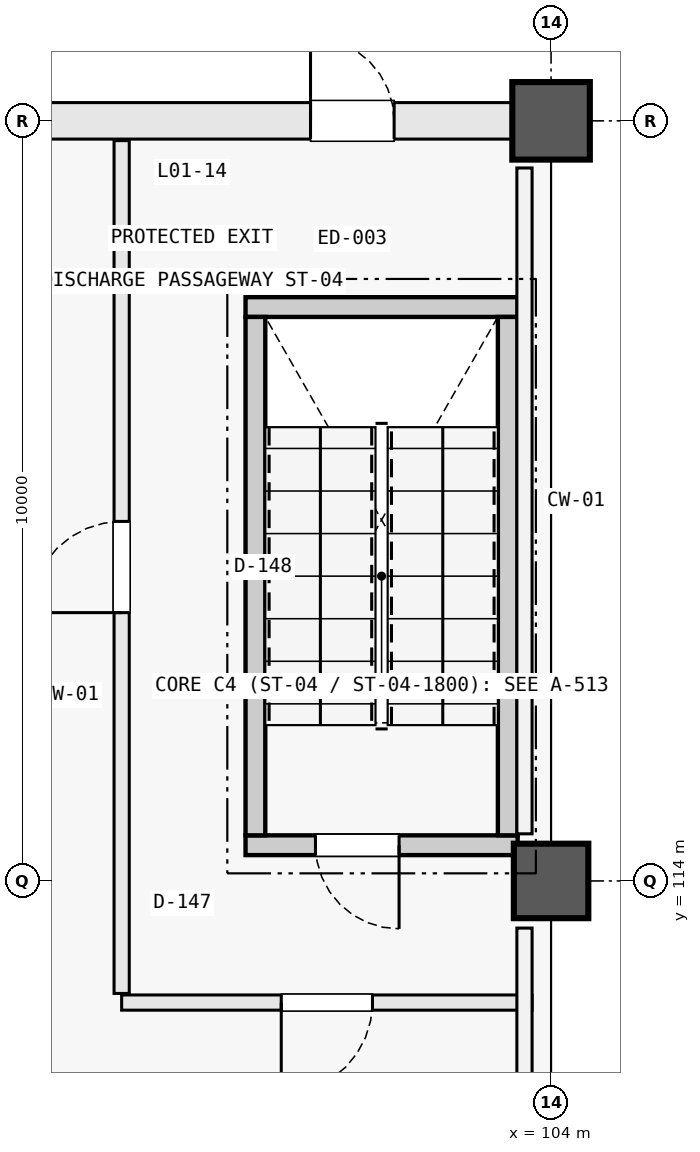
"""IFC4 building model, lengths in metres.
Left out: names, types, materials, properties, quantities, classifications, styles, units other than length and angle.
Written with IfcOpenShell. Run it as: python <this file> out.ifc"""

import sys

from ifc_helpers import new_model, si_unit, direction, frame, frame_2d, origin, origin_2d, place, context, subcontext, project, spatial, rectangle, circle, extrude, element, fill, save


model = new_model("IFC4")
c1 = context("Model", 3, precision=1e-05, world=origin(), true_north=direction((0.0, 1.0)))
c2 = subcontext(c1, "Body", "Model", "MODEL_VIEW")
j1 = project(units=[si_unit("LENGTHUNIT", "METRE"), si_unit("PLANEANGLEUNIT", "RADIAN")], contexts=[c1])
p1 = place(None, origin())
s1 = spatial("IfcSite", under=j1, at=p1, CompositionType="ELEMENT")
p2 = place(p1, origin())
s2 = spatial("IfcBuilding", under=s1, at=p2, CompositionType="ELEMENT")
p3 = place(p2, origin())
s3 = spatial("IfcBuildingStorey", under=s2, at=p3, CompositionType="ELEMENT", Elevation=0.0)
p4 = place(p3, frame((104.0, 114.0, 0.0), z_axis=(0.0, 0.0, 1.0), x_axis=(1.0, 0.0, 0.0)))
e1 = element("IfcColumn", 1, at=p4, inside=s3, PredefinedType="COLUMN", context=c2, shape_type="SweptSolid", body=[
    extrude(rectangle(XDim=0.98, YDim=0.98, at=origin_2d()), origin(), (0.0, 0.0, 1.0), 5.4),
])
p5 = place(p3, frame((104.0, 124.0, 0.0), z_axis=(0.0, 0.0, 1.0), x_axis=(1.0, 0.0, 0.0)))
e2 = element("IfcColumn", 2, at=p5, inside=s3, PredefinedType="COLUMN", context=c2, shape_type="SweptSolid", body=[
    extrude(circle(Radius=0.51, at=origin_2d()), origin(), (0.0, 0.0, 1.0), 5.4),
])
p6 = place(p3, frame((96.485, 124.0, 0.0), z_axis=(0.0, 0.0, 1.0), x_axis=(1.0, 0.0, 0.0)))
e3 = element("IfcWall", 3, at=p6, inside=s3, PredefinedType="STANDARD", context=c2, shape_type="SweptSolid", body=[
    extrude(rectangle(XDim=7.056, YDim=0.48, at=frame_2d((3.528, 0.0))), origin(), (0.0, 0.0, 1.0), 3.91),
])
p7 = place(p6, frame((4.35, 0.0, 0.0)))
e4 = element("IfcOpeningElement", 4, at=p7, cuts=e3, PredefinedType="OPENING", context=c2, shape_type="SweptSolid", body=[
    extrude(rectangle(XDim=1.1, YDim=2.25, at=frame_2d((0.55, 1.125))), frame((0.0, 0.252, 0.0), z_axis=(0.0, -1.0, 0.0), x_axis=(1.0, 0.0, 0.0)), (0.0, 0.0, 1.0), 0.504),
])
p8 = place(p3, frame((99.98, 114.47, 0.0), z_axis=(0.0, 0.0, 1.0), x_axis=(1.0, 0.0, 0.0)))
e5 = element("IfcWall", 5, at=p8, inside=s3, PredefinedType="SOLIDWALL", context=c2, shape_type="SweptSolid", body=[
    extrude(rectangle(XDim=3.58, YDim=0.26, at=frame_2d((1.79, 0.0))), origin(), (0.0, 0.0, 1.0), 5.4),
])
p9 = place(p8, frame((0.92, 0.0, 0.0)))
e6 = element("IfcOpeningElement", 6, at=p9, cuts=e5, PredefinedType="OPENING", context=c2, shape_type="SweptSolid", body=[
    extrude(rectangle(XDim=1.1, YDim=2.2, at=frame_2d((0.55, 1.1))), frame((0.0, 0.142, 0.0), z_axis=(0.0, -1.0, 0.0), x_axis=(1.0, 0.0, 0.0)), (0.0, 0.0, 1.0), 0.284),
])
p10 = place(p3, frame((99.98, 121.55, 0.0), z_axis=(0.0, 0.0, 1.0), x_axis=(1.0, 0.0, 0.0)))
e7 = element("IfcWall", 7, at=p10, inside=s3, PredefinedType="SOLIDWALL", context=c2, shape_type="SweptSolid", body=[
    extrude(rectangle(XDim=3.58, YDim=0.26, at=frame_2d((1.79, 0.0))), origin(), (0.0, 0.0, 1.0), 5.4),
])
for number, where, z_axis, x_axis in (
    (8, (100.11, 114.6, 0.0), (0.0, 0.0, 1.0), (0.0, 1.0, 0.0)),
    (9, (103.43, 114.6, 0.0), (0.0, 0.0, 1.0), (0.0, 1.0, 0.0)),
):
    element("IfcWall", number, at=place(p3, frame(where, z_axis=z_axis, x_axis=x_axis)), inside=s3, PredefinedType="SOLIDWALL", context=c2, shape_type="SweptSolid", body=[
        extrude(rectangle(XDim=6.82, YDim=0.26, at=frame_2d((3.41, 0.0))), origin(), (0.0, 0.0, 1.0), 5.4),
    ])
p11 = place(p3, frame((98.35, 112.4, 0.0), z_axis=(0.0, 0.0, 1.0), x_axis=(1.0, 0.0, 0.0)))
e10 = element("IfcWall", 10, at=p11, inside=s3, PredefinedType="PARTITIONING", context=c2, shape_type="SweptSolid", body=[
    extrude(rectangle(XDim=5.4, YDim=0.2, at=frame_2d((2.7, 0.0))), origin(), (0.0, 0.0, 1.0), 3.88),
])
p12 = place(p11, frame((2.1, 0.0, 0.0)))
e11 = element("IfcOpeningElement", 11, at=p12, cuts=e10, PredefinedType="OPENING", context=c2, shape_type="SweptSolid", body=[
    extrude(rectangle(XDim=1.2, YDim=2.25, at=frame_2d((0.6, 1.125))), frame((0.0, 0.112, 0.0), z_axis=(0.0, -1.0, 0.0), x_axis=(1.0, 0.0, 0.0)), (0.0, 0.0, 1.0), 0.224),
])
p13 = place(p3, frame((98.35, 112.52, 0.0), z_axis=(0.0, 0.0, 1.0), x_axis=(0.0, 1.0, 0.0)))
e12 = element("IfcWall", 12, at=p13, inside=s3, PredefinedType="PARTITIONING", context=c2, shape_type="SweptSolid", body=[
    extrude(rectangle(XDim=11.22, YDim=0.2, at=frame_2d((5.61, 0.0))), origin(), (0.0, 0.0, 1.0), 3.88),
])
p14 = place(p13, frame((5.01, 0.0, 0.0)))
e13 = element("IfcOpeningElement", 13, at=p14, cuts=e12, PredefinedType="OPENING", context=c2, shape_type="SweptSolid", body=[
    extrude(rectangle(XDim=1.2, YDim=2.25, at=frame_2d((0.6, 1.125))), frame((0.0, 0.112, 0.0), z_axis=(0.0, -1.0, 0.0), x_axis=(1.0, 0.0, 0.0)), (0.0, 0.0, 1.0), 0.224),
])
p15 = place(p7, origin())
e14 = element("IfcDoor", 14, at=p15, inside=s3, OperationType="SINGLE_SWING_LEFT", PredefinedType="DOOR", context=c2, shape_type="SweptSolid", body=[
    extrude(rectangle(XDim=1.1, YDim=2.25, at=frame_2d((0.55, 1.125))), frame((0.0, 0.025, 0.0), z_axis=(0.0, -1.0, 0.0), x_axis=(1.0, 0.0, 0.0)), (0.0, 0.0, 1.0), 0.05),
])
fill(e4, e14)
p16 = place(p9, frame((1.1, 0.0, 0.0), z_axis=(0.0, 0.0, 1.0), x_axis=(-1.0, 0.0, 0.0)))
e15 = element("IfcDoor", 15, at=p16, inside=s3, OperationType="SINGLE_SWING_RIGHT", PredefinedType="DOOR", context=c2, shape_type="SweptSolid", body=[
    extrude(rectangle(XDim=1.1, YDim=2.2, at=frame_2d((0.55, 1.1))), frame((0.0, 0.025, 0.0), z_axis=(0.0, -1.0, 0.0), x_axis=(1.0, 0.0, 0.0)), (0.0, 0.0, 1.0), 0.05),
])
fill(e6, e15)
p17 = place(p12, frame((1.2, 0.0, 0.0), z_axis=(0.0, 0.0, 1.0), x_axis=(-1.0, 0.0, 0.0)))
e16 = element("IfcDoor", 16, at=p17, inside=s3, OperationType="SINGLE_SWING_LEFT", PredefinedType="DOOR", context=c2, shape_type="SweptSolid", body=[
    extrude(rectangle(XDim=1.2, YDim=2.25, at=frame_2d((0.6, 1.125))), frame((0.0, 0.025, 0.0), z_axis=(0.0, -1.0, 0.0), x_axis=(1.0, 0.0, 0.0)), (0.0, 0.0, 1.0), 0.05),
])
fill(e11, e16)
p18 = place(p14, origin())
e17 = element("IfcDoor", 17, at=p18, inside=s3, OperationType="SINGLE_SWING_LEFT", PredefinedType="DOOR", context=c2, shape_type="SweptSolid", body=[
    extrude(rectangle(XDim=1.2, YDim=2.25, at=frame_2d((0.6, 1.125))), frame((0.0, 0.025, 0.0), z_axis=(0.0, -1.0, 0.0), x_axis=(1.0, 0.0, 0.0)), (0.0, 0.0, 1.0), 0.05),
])
fill(e13, e17)
save(model, sys.argv[1])
